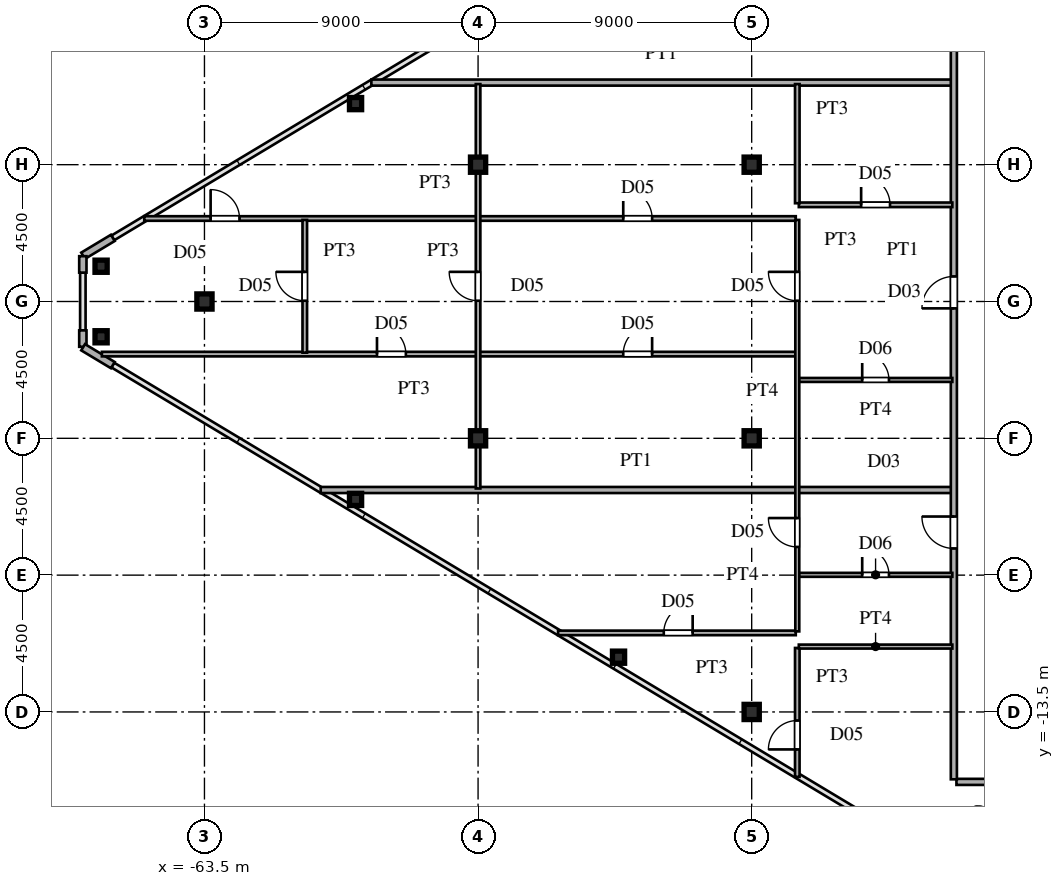
"""IFC4 building model, lengths in metres.
Left out: names, types, materials, properties, quantities, classifications, styles, units other than length and angle.
Written with IfcOpenShell. Run it as: python <this file> out.ifc"""

import sys

from ifc_helpers import new_model, si_unit, direction, frame, frame_2d, origin, origin_2d, place, context, subcontext, project, spatial, rectangle, hollow_rectangle, i_section, extrude, source, transform, mapped, element, fill, save


model = new_model("IFC4")
c1 = context("Model", 3, precision=1e-05, world=origin(), true_north=direction((0.0, 1.0)))
c2 = subcontext(c1, "Body", "Model", "MODEL_VIEW")
j1 = project(units=[si_unit("LENGTHUNIT", "METRE"), si_unit("PLANEANGLEUNIT", "RADIAN")], contexts=[c1])
p1 = place(None, origin())
s1 = spatial("IfcSite", under=j1, at=p1, CompositionType="ELEMENT")
p2 = place(p1, origin())
s2 = spatial("IfcBuilding", under=s1, at=p2, CompositionType="ELEMENT")
p3 = place(p2, frame((0.0, 0.0, 199.5)))
s3 = spatial("IfcBuildingStorey", under=s2, at=p3, CompositionType="ELEMENT", Elevation=199.5)
m1 = source(origin(), c2, "Body", "SweptSolid", [
    extrude(i_section(OverallWidth=0.5, OverallDepth=0.5, WebThickness=0.02, FlangeThickness=0.032, at=origin_2d()), origin(), (0.0, 0.0, 1.0), 3.6),
])
for number, where, z_axis, x_axis in (
    (1, (-45.5, -13.5, 0.0), (0.0, 0.0, 1.0), (1.0, 0.0, 0.0)),
    (2, (-45.5, -4.5, 0.0), (0.0, 0.0, 1.0), (1.0, 0.0, 0.0)),
    (3, (-45.5, 4.5, 0.0), (0.0, 0.0, 1.0), (1.0, 0.0, 0.0)),
    (4, (-54.5, -4.5, 0.0), (0.0, 0.0, 1.0), (1.0, 0.0, 0.0)),
    (5, (-54.5, 4.5, 0.0), (0.0, 0.0, 1.0), (1.0, 0.0, 0.0)),
    (6, (-63.5, 0.0, 0.0), (0.0, 0.0, 1.0), (1.0, 0.0, 0.0)),
):
    element("IfcColumn", number, at=place(p3, frame(where, z_axis=z_axis, x_axis=x_axis)), inside=s3, PredefinedType="COLUMN", context=c2, shape_type="MappedRepresentation", body=[
        mapped(m1, transform((0.0, 0.0, 0.0), scale=1.0)),
    ])
m2 = source(origin(), c2, "Body", "SweptSolid", [
    extrude(hollow_rectangle(XDim=0.4, YDim=0.4, WallThickness=0.016, at=origin_2d()), origin(), (0.0, 0.0, 1.0), 3.6),
])
for number, where, z_axis, x_axis in (
    (7, (-66.9, 1.16, 0.0), (0.0, 0.0, 1.0), (1.0, 0.0, 0.0)),
    (8, (-66.9, -1.16, 0.0), (0.0, 0.0, 1.0), (1.0, 0.0, 0.0)),
    (9, (-49.88, -11.699, 0.0), (0.0, 0.0, 1.0), (1.0, 0.0, 0.0)),
    (10, (-58.53, -6.509, 0.0), (0.0, 0.0, 1.0), (1.0, 0.0, 0.0)),
    (11, (-58.53, 6.509, 0.0), (0.0, 0.0, 1.0), (1.0, 0.0, 0.0)),
):
    element("IfcColumn", number, at=place(p3, frame(where, z_axis=z_axis, x_axis=x_axis)), inside=s3, PredefinedType="COLUMN", context=c2, shape_type="MappedRepresentation", body=[
        mapped(m2, transform((0.0, 0.0, 0.0), scale=1.0)),
    ])
p4 = place(p3, frame((-66.514, 2.092, 0.0), z_axis=(0.0, 0.0, 1.0), x_axis=(-0.85743623509, -0.514590228002, 0.0)))
e12 = element("IfcWall", 12, at=p4, inside=s3, PredefinedType="SOLIDWALL", context=c2, shape_type="SweptSolid", body=[
    extrude(rectangle(XDim=1.14, YDim=0.24, at=frame_2d((0.57, 0.0))), origin(), (0.0, 0.0, 1.0), 3.38),
])
for number, where, z_axis, x_axis in (
    (13, (-67.5, 1.49, 0.0), (0.0, 0.0, 1.0), (0.0, -1.0, 0.0)),
    (14, (-67.5, -0.95, 0.0), (0.0, 0.0, 1.0), (0.0, -1.0, 0.0)),
):
    element("IfcWall", number, at=place(p3, frame(where, z_axis=z_axis, x_axis=x_axis)), inside=s3, PredefinedType="SOLIDWALL", context=c2, shape_type="SweptSolid", body=[
        extrude(rectangle(XDim=0.54, YDim=0.24, at=frame_2d((0.27, 0.0))), origin(), (0.0, 0.0, 1.0), 3.38),
    ])
p5 = place(p3, frame((-67.491, -1.505, 0.0), z_axis=(0.0, 0.0, 1.0), x_axis=(0.85743623509, -0.514590228002, 0.0)))
e15 = element("IfcWall", 15, at=p5, inside=s3, PredefinedType="SOLIDWALL", context=c2, shape_type="SweptSolid", body=[
    extrude(rectangle(XDim=1.14, YDim=0.24, at=frame_2d((0.57, 0.0))), origin(), (0.0, 0.0, 1.0), 3.38),
])
p6 = place(p3, frame((-38.765, -15.8, 0.0), z_axis=(0.0, 0.0, 1.0), x_axis=(1.0, 0.0, 0.0)))
e16 = element("IfcWall", 16, at=p6, inside=s3, PredefinedType="PARTITIONING", context=c2, shape_type="SweptSolid", body=[
    extrude(rectangle(XDim=11.14, YDim=0.2, at=frame_2d((5.57, 0.0))), origin(), (0.0, 0.0, 1.0), 3.38),
])
p7 = place(p3, frame((-43.95, -11.35, 0.0), z_axis=(0.0, 0.0, 1.0), x_axis=(1.0, 0.0, 0.0)))
e17 = element("IfcWall", 17, at=p7, inside=s3, PredefinedType="PARTITIONING", context=c2, shape_type="SweptSolid", body=[
    extrude(rectangle(XDim=5.05, YDim=0.13, at=frame_2d((2.525, 0.0))), origin(), (0.0, 0.0, 1.0), 3.38),
])
p8 = place(p3, frame((-51.868, -10.9, 0.0), z_axis=(0.0, 0.0, 1.0), x_axis=(1.0, 0.0, 0.0)))
e18 = element("IfcWall", 18, at=p8, inside=s3, PredefinedType="PARTITIONING", context=c2, shape_type="SweptSolid", body=[
    extrude(rectangle(XDim=7.818, YDim=0.15, at=frame_2d((3.909, 0.0))), origin(), (0.0, 0.0, 1.0), 3.38),
])
p9 = place(p8, frame((3.476, 0.0, 0.0)))
e19 = element("IfcOpeningElement", 19, at=p9, cuts=e18, PredefinedType="OPENING", context=c2, shape_type="SweptSolid", body=[
    extrude(rectangle(XDim=0.95, YDim=2.15, at=frame_2d((0.475, 1.075))), frame((0.0, 0.085, 0.0), z_axis=(0.0, -1.0, 0.0), x_axis=(1.0, 0.0, 0.0)), (0.0, 0.0, 1.0), 0.17),
])
p10 = place(p3, frame((-43.95, -8.99, 0.0), z_axis=(0.0, 0.0, 1.0), x_axis=(1.0, 0.0, 0.0)))
e20 = element("IfcWall", 20, at=p10, inside=s3, PredefinedType="PARTITIONING", context=c2, shape_type="SweptSolid", body=[
    extrude(rectangle(XDim=5.05, YDim=0.13, at=frame_2d((2.525, 0.0))), origin(), (0.0, 0.0, 1.0), 3.38),
])
p11 = place(p10, frame((2.085, 0.0, 0.0)))
e21 = element("IfcOpeningElement", 21, at=p11, cuts=e20, PredefinedType="OPENING", context=c2, shape_type="SweptSolid", body=[
    extrude(rectangle(XDim=0.88, YDim=2.1, at=frame_2d((0.44, 1.05))), frame((0.0, 0.075, 0.0), z_axis=(0.0, -1.0, 0.0), x_axis=(1.0, 0.0, 0.0)), (0.0, 0.0, 1.0), 0.15),
])
p12 = place(p3, frame((-59.676, -6.2, 0.0), z_axis=(0.0, 0.0, 1.0), x_axis=(1.0, 0.0, 0.0)))
e22 = element("IfcWall", 22, at=p12, inside=s3, PredefinedType="PARTITIONING", context=c2, shape_type="SweptSolid", body=[
    extrude(rectangle(XDim=20.746, YDim=0.2, at=frame_2d((10.373, 0.0))), origin(), (0.0, 0.0, 1.0), 3.38),
])
p13 = place(p3, frame((-43.95, -2.58, 0.0), z_axis=(0.0, 0.0, 1.0), x_axis=(1.0, 0.0, 0.0)))
e23 = element("IfcWall", 23, at=p13, inside=s3, PredefinedType="PARTITIONING", context=c2, shape_type="SweptSolid", body=[
    extrude(rectangle(XDim=5.05, YDim=0.13, at=frame_2d((2.525, 0.0))), origin(), (0.0, 0.0, 1.0), 3.38),
])
p14 = place(p13, frame((2.085, 0.0, 0.0)))
e24 = element("IfcOpeningElement", 24, at=p14, cuts=e23, PredefinedType="OPENING", context=c2, shape_type="SweptSolid", body=[
    extrude(rectangle(XDim=0.88, YDim=2.1, at=frame_2d((0.44, 1.05))), frame((0.0, 0.075, 0.0), z_axis=(0.0, -1.0, 0.0), x_axis=(1.0, 0.0, 0.0)), (0.0, 0.0, 1.0), 0.15),
])
p15 = place(p3, frame((-66.874, -1.73, 0.0), z_axis=(0.0, 0.0, 1.0), x_axis=(1.0, 0.0, 0.0)))
e25 = element("IfcWall", 25, at=p15, inside=s3, PredefinedType="PARTITIONING", context=c2, shape_type="SweptSolid", body=[
    extrude(rectangle(XDim=22.824, YDim=0.15, at=frame_2d((11.412, 0.0))), origin(), (0.0, 0.0, 1.0), 3.38),
])
p16 = place(p15, frame((17.149, 0.0, 0.0)))
e26 = element("IfcOpeningElement", 26, at=p16, cuts=e25, PredefinedType="OPENING", context=c2, shape_type="SweptSolid", body=[
    extrude(rectangle(XDim=0.95, YDim=2.15, at=frame_2d((0.475, 1.075))), frame((0.0, 0.085, 0.0), z_axis=(0.0, -1.0, 0.0), x_axis=(1.0, 0.0, 0.0)), (0.0, 0.0, 1.0), 0.17),
])
p17 = place(p15, frame((9.049, 0.0, 0.0)))
e27 = element("IfcOpeningElement", 27, at=p17, cuts=e25, PredefinedType="OPENING", context=c2, shape_type="SweptSolid", body=[
    extrude(rectangle(XDim=0.95, YDim=2.15, at=frame_2d((0.475, 1.075))), frame((0.0, 0.085, 0.0), z_axis=(0.0, -1.0, 0.0), x_axis=(1.0, 0.0, 0.0)), (0.0, 0.0, 1.0), 0.17),
])
p18 = place(p3, frame((-65.48, 2.73, 0.0), z_axis=(0.0, 0.0, 1.0), x_axis=(1.0, 0.0, 0.0)))
e28 = element("IfcWall", 28, at=p18, inside=s3, PredefinedType="PARTITIONING", context=c2, shape_type="SweptSolid", body=[
    extrude(rectangle(XDim=21.43, YDim=0.15, at=frame_2d((10.715, 0.0))), origin(), (0.0, 0.0, 1.0), 3.38),
])
p19 = place(p18, frame((15.755, 0.0, 0.0)))
e29 = element("IfcOpeningElement", 29, at=p19, cuts=e28, PredefinedType="OPENING", context=c2, shape_type="SweptSolid", body=[
    extrude(rectangle(XDim=0.95, YDim=2.15, at=frame_2d((0.475, 1.075))), frame((0.0, 0.085, 0.0), z_axis=(0.0, -1.0, 0.0), x_axis=(1.0, 0.0, 0.0)), (0.0, 0.0, 1.0), 0.17),
])
p20 = place(p18, frame((2.183, 0.0, 0.0)))
e30 = element("IfcOpeningElement", 30, at=p20, cuts=e28, PredefinedType="OPENING", context=c2, shape_type="SweptSolid", body=[
    extrude(rectangle(XDim=0.95, YDim=2.15, at=frame_2d((0.475, 1.075))), frame((0.0, 0.085, 0.0), z_axis=(0.0, -1.0, 0.0), x_axis=(1.0, 0.0, 0.0)), (0.0, 0.0, 1.0), 0.17),
])
p21 = place(p3, frame((-43.95, 3.18, 0.0), z_axis=(0.0, 0.0, 1.0), x_axis=(1.0, 0.0, 0.0)))
e31 = element("IfcWall", 31, at=p21, inside=s3, PredefinedType="PARTITIONING", context=c2, shape_type="SweptSolid", body=[
    extrude(rectangle(XDim=5.05, YDim=0.15, at=frame_2d((2.525, 0.0))), origin(), (0.0, 0.0, 1.0), 3.38),
])
p22 = place(p21, frame((2.05, 0.0, 0.0)))
e32 = element("IfcOpeningElement", 32, at=p22, cuts=e31, PredefinedType="OPENING", context=c2, shape_type="SweptSolid", body=[
    extrude(rectangle(XDim=0.95, YDim=2.15, at=frame_2d((0.475, 1.075))), frame((0.0, 0.085, 0.0), z_axis=(0.0, -1.0, 0.0), x_axis=(1.0, 0.0, 0.0)), (0.0, 0.0, 1.0), 0.17),
])
p23 = place(p3, frame((-58.01, 7.2, 0.0), z_axis=(0.0, 0.0, 1.0), x_axis=(1.0, 0.0, 0.0)))
e33 = element("IfcWall", 33, at=p23, inside=s3, PredefinedType="PARTITIONING", context=c2, shape_type="SweptSolid", body=[
    extrude(rectangle(XDim=19.08, YDim=0.2, at=frame_2d((9.54, 0.0))), origin(), (0.0, 0.0, 1.0), 3.38),
])
p24 = place(p3, frame((-60.2, -1.683, 0.0), z_axis=(0.0, 0.0, 1.0), x_axis=(0.0, 1.0, 0.0)))
e34 = element("IfcWall", 34, at=p24, inside=s3, PredefinedType="PARTITIONING", context=c2, shape_type="SweptSolid", body=[
    extrude(rectangle(XDim=4.366, YDim=0.15, at=frame_2d((2.183, 0.0))), origin(), (0.0, 0.0, 1.0), 3.38),
])
p25 = place(p24, frame((1.708, 0.0, 0.0)))
e35 = element("IfcOpeningElement", 35, at=p25, cuts=e34, PredefinedType="OPENING", context=c2, shape_type="SweptSolid", body=[
    extrude(rectangle(XDim=0.95, YDim=2.15, at=frame_2d((0.475, 1.075))), frame((0.0, 0.085, 0.0), z_axis=(0.0, -1.0, 0.0), x_axis=(1.0, 0.0, 0.0)), (0.0, 0.0, 1.0), 0.17),
])
p26 = place(p3, frame((-54.5, -6.15, 0.0), z_axis=(0.0, 0.0, 1.0), x_axis=(0.0, 1.0, 0.0)))
e36 = element("IfcWall", 36, at=p26, inside=s3, PredefinedType="PARTITIONING", context=c2, shape_type="SweptSolid", body=[
    extrude(rectangle(XDim=13.3, YDim=0.15, at=frame_2d((6.65, 0.0))), origin(), (0.0, 0.0, 1.0), 2.78),
])
p27 = place(p26, frame((6.175, 0.0, 0.0)))
e37 = element("IfcOpeningElement", 37, at=p27, cuts=e36, PredefinedType="OPENING", context=c2, shape_type="SweptSolid", body=[
    extrude(rectangle(XDim=0.95, YDim=2.15, at=frame_2d((0.475, 1.075))), frame((0.0, 0.085, 0.0), z_axis=(0.0, -1.0, 0.0), x_axis=(1.0, 0.0, 0.0)), (0.0, 0.0, 1.0), 0.17),
])
p28 = place(p3, frame((-44.0, -15.635, 0.0), z_axis=(0.0, 0.0, 1.0), x_axis=(0.0, 1.0, 0.0)))
e38 = element("IfcWall", 38, at=p28, inside=s3, PredefinedType="PARTITIONING", context=c2, shape_type="SweptSolid", body=[
    extrude(rectangle(XDim=4.24, YDim=0.15, at=frame_2d((2.12, 0.0))), origin(), (0.0, 0.0, 1.0), 3.38),
])
p29 = place(p28, frame((0.903, 0.0, 0.0)))
e39 = element("IfcOpeningElement", 39, at=p29, cuts=e38, PredefinedType="OPENING", context=c2, shape_type="SweptSolid", body=[
    extrude(rectangle(XDim=0.95, YDim=2.15, at=frame_2d((0.475, 1.075))), frame((0.0, 0.085, 0.0), z_axis=(0.0, -1.0, 0.0), x_axis=(1.0, 0.0, 0.0)), (0.0, 0.0, 1.0), 0.17),
])
p30 = place(p3, frame((-44.0, -10.85, 0.0), z_axis=(0.0, 0.0, 1.0), x_axis=(0.0, 1.0, 0.0)))
e40 = element("IfcWall", 40, at=p30, inside=s3, PredefinedType="PARTITIONING", context=c2, shape_type="SweptSolid", body=[
    extrude(rectangle(XDim=13.533, YDim=0.13, at=frame_2d((6.767, 0.0))), origin(), (0.0, 0.0, 1.0), 3.38),
])
p31 = place(p30, frame((2.778, 0.0, 0.0)))
e41 = element("IfcOpeningElement", 41, at=p31, cuts=e40, PredefinedType="OPENING", context=c2, shape_type="SweptSolid", body=[
    extrude(rectangle(XDim=0.95, YDim=2.15, at=frame_2d((0.475, 1.075))), frame((0.0, 0.075, 0.0), z_axis=(0.0, -1.0, 0.0), x_axis=(1.0, 0.0, 0.0)), (0.0, 0.0, 1.0), 0.15),
])
p32 = place(p30, frame((10.875, 0.0, 0.0)))
e42 = element("IfcOpeningElement", 42, at=p32, cuts=e40, PredefinedType="OPENING", context=c2, shape_type="SweptSolid", body=[
    extrude(rectangle(XDim=0.95, YDim=2.15, at=frame_2d((0.475, 1.075))), frame((0.0, 0.075, 0.0), z_axis=(0.0, -1.0, 0.0), x_axis=(1.0, 0.0, 0.0)), (0.0, 0.0, 1.0), 0.15),
])
p33 = place(p3, frame((-44.0, 3.232, 0.0), z_axis=(0.0, 0.0, 1.0), x_axis=(0.0, 1.0, 0.0)))
e43 = element("IfcWall", 43, at=p33, inside=s3, PredefinedType="PARTITIONING", context=c2, shape_type="SweptSolid", body=[
    extrude(rectangle(XDim=3.918, YDim=0.15, at=frame_2d((1.959, 0.0))), origin(), (0.0, 0.0, 1.0), 3.38),
])
p34 = place(p3, frame((-38.85, -15.715, 0.0), z_axis=(0.0, 0.0, 1.0), x_axis=(0.0, 1.0, 0.0)))
e44 = element("IfcWall", 44, at=p34, inside=s3, PredefinedType="PARTITIONING", context=c2, shape_type="SweptSolid", body=[
    extrude(rectangle(XDim=31.43, YDim=0.2, at=frame_2d((15.715, 0.0))), origin(), (0.0, 0.0, 1.0), 3.38),
])
p35 = place(p34, frame((7.593, 0.0, 0.0)))
e45 = element("IfcOpeningElement", 45, at=p35, cuts=e44, PredefinedType="OPENING", context=c2, shape_type="SweptSolid", body=[
    extrude(rectangle(XDim=1.05, YDim=2.25, at=frame_2d((0.525, 1.125))), frame((0.0, 0.11, 0.0), z_axis=(0.0, -1.0, 0.0), x_axis=(1.0, 0.0, 0.0)), (0.0, 0.0, 1.0), 0.22),
])
p36 = place(p34, frame((15.489, 0.0, 0.0)))
e46 = element("IfcOpeningElement", 46, at=p36, cuts=e44, PredefinedType="OPENING", context=c2, shape_type="SweptSolid", body=[
    extrude(rectangle(XDim=1.05, YDim=2.25, at=frame_2d((0.525, 1.125))), frame((0.0, 0.11, 0.0), z_axis=(0.0, -1.0, 0.0), x_axis=(1.0, 0.0, 0.0)), (0.0, 0.0, 1.0), 0.22),
])
p37 = place(p34, frame((26.69, 0.0, 0.0)))
e47 = element("IfcOpeningElement", 47, at=p37, cuts=e44, PredefinedType="OPENING", context=c2, shape_type="SweptSolid", body=[
    extrude(rectangle(XDim=1.05, YDim=2.25, at=frame_2d((0.525, 1.125))), frame((0.0, 0.11, 0.0), z_axis=(0.0, -1.0, 0.0), x_axis=(1.0, 0.0, 0.0)), (0.0, 0.0, 1.0), 0.22),
])
m3 = source(origin(), c2, "Body", "SweptSolid", [
    extrude(rectangle(XDim=0.95, YDim=2.15, at=frame_2d((0.475, 1.075))), frame((0.0, 0.025, 0.0), z_axis=(0.0, -1.0, 0.0), x_axis=(1.0, 0.0, 0.0)), (0.0, 0.0, 1.0), 0.05),
])
p38 = place(p9, origin())
e48 = element("IfcDoor", 48, at=p38, inside=s3, OperationType="SINGLE_SWING_RIGHT", PredefinedType="DOOR", context=c2, shape_type="MappedRepresentation", body=[
    mapped(m3, transform((0.0, 0.0, 0.0), scale=1.0)),
])
fill(e19, e48)
m4 = source(origin(), c2, "Body", "SweptSolid", [
    extrude(rectangle(XDim=0.88, YDim=2.1, at=frame_2d((0.44, 1.05))), frame((0.0, 0.025, 0.0), z_axis=(0.0, -1.0, 0.0), x_axis=(1.0, 0.0, 0.0)), (0.0, 0.0, 1.0), 0.05),
])
p39 = place(p11, origin())
e49 = element("IfcDoor", 49, at=p39, inside=s3, OperationType="SINGLE_SWING_LEFT", PredefinedType="DOOR", context=c2, shape_type="MappedRepresentation", body=[
    mapped(m4, transform((0.0, 0.0, 0.0), scale=1.0)),
])
fill(e21, e49)
p40 = place(p14, origin())
e50 = element("IfcDoor", 50, at=p40, inside=s3, OperationType="SINGLE_SWING_LEFT", PredefinedType="DOOR", context=c2, shape_type="MappedRepresentation", body=[
    mapped(m4, transform((0.0, 0.0, 0.0), scale=1.0)),
])
fill(e24, e50)
p41 = place(p16, origin())
e51 = element("IfcDoor", 51, at=p41, inside=s3, OperationType="SINGLE_SWING_RIGHT", PredefinedType="DOOR", context=c2, shape_type="MappedRepresentation", body=[
    mapped(m3, transform((0.0, 0.0, 0.0), scale=1.0)),
])
fill(e26, e51)
p42 = place(p17, origin())
e52 = element("IfcDoor", 52, at=p42, inside=s3, OperationType="SINGLE_SWING_LEFT", PredefinedType="DOOR", context=c2, shape_type="MappedRepresentation", body=[
    mapped(m3, transform((0.0, 0.0, 0.0), scale=1.0)),
])
fill(e27, e52)
p43 = place(p19, origin())
e53 = element("IfcDoor", 53, at=p43, inside=s3, OperationType="SINGLE_SWING_LEFT", PredefinedType="DOOR", context=c2, shape_type="MappedRepresentation", body=[
    mapped(m3, transform((0.0, 0.0, 0.0), scale=1.0)),
])
fill(e29, e53)
p44 = place(p20, origin())
e54 = element("IfcDoor", 54, at=p44, inside=s3, OperationType="SINGLE_SWING_LEFT", PredefinedType="DOOR", context=c2, shape_type="MappedRepresentation", body=[
    mapped(m3, transform((0.0, 0.0, 0.0), scale=1.0)),
])
fill(e30, e54)
p45 = place(p22, origin())
e55 = element("IfcDoor", 55, at=p45, inside=s3, OperationType="SINGLE_SWING_LEFT", PredefinedType="DOOR", context=c2, shape_type="MappedRepresentation", body=[
    mapped(m3, transform((0.0, 0.0, 0.0), scale=1.0)),
])
fill(e32, e55)
p46 = place(p25, origin())
e56 = element("IfcDoor", 56, at=p46, inside=s3, OperationType="SINGLE_SWING_RIGHT", PredefinedType="DOOR", context=c2, shape_type="MappedRepresentation", body=[
    mapped(m3, transform((0.0, 0.0, 0.0), scale=1.0)),
])
fill(e35, e56)
p47 = place(p27, origin())
e57 = element("IfcDoor", 57, at=p47, inside=s3, OperationType="SINGLE_SWING_RIGHT", PredefinedType="DOOR", context=c2, shape_type="MappedRepresentation", body=[
    mapped(m3, transform((0.0, 0.0, 0.0), scale=1.0)),
])
fill(e37, e57)
p48 = place(p29, origin())
e58 = element("IfcDoor", 58, at=p48, inside=s3, OperationType="SINGLE_SWING_LEFT", PredefinedType="DOOR", context=c2, shape_type="MappedRepresentation", body=[
    mapped(m3, transform((0.0, 0.0, 0.0), scale=1.0)),
])
fill(e39, e58)
p49 = place(p31, origin())
e59 = element("IfcDoor", 59, at=p49, inside=s3, OperationType="SINGLE_SWING_RIGHT", PredefinedType="DOOR", context=c2, shape_type="MappedRepresentation", body=[
    mapped(m3, transform((0.0, 0.0, 0.0), scale=1.0)),
])
fill(e41, e59)
p50 = place(p32, origin())
e60 = element("IfcDoor", 60, at=p50, inside=s3, OperationType="SINGLE_SWING_RIGHT", PredefinedType="DOOR", context=c2, shape_type="MappedRepresentation", body=[
    mapped(m3, transform((0.0, 0.0, 0.0), scale=1.0)),
])
fill(e42, e60)
m5 = source(origin(), c2, "Body", "SweptSolid", [
    extrude(rectangle(XDim=1.05, YDim=2.25, at=frame_2d((0.525, 1.125))), frame((0.0, 0.025, 0.0), z_axis=(0.0, -1.0, 0.0), x_axis=(1.0, 0.0, 0.0)), (0.0, 0.0, 1.0), 0.05),
])
p51 = place(p35, origin())
e61 = element("IfcDoor", 61, at=p51, inside=s3, OperationType="SINGLE_SWING_RIGHT", PredefinedType="DOOR", context=c2, shape_type="MappedRepresentation", body=[
    mapped(m5, transform((0.0, 0.0, 0.0), scale=1.0)),
])
fill(e45, e61)
p52 = place(p36, origin())
e62 = element("IfcDoor", 62, at=p52, inside=s3, OperationType="SINGLE_SWING_LEFT", PredefinedType="DOOR", context=c2, shape_type="MappedRepresentation", body=[
    mapped(m5, transform((0.0, 0.0, 0.0), scale=1.0)),
])
fill(e46, e62)
save(model, sys.argv[1])
